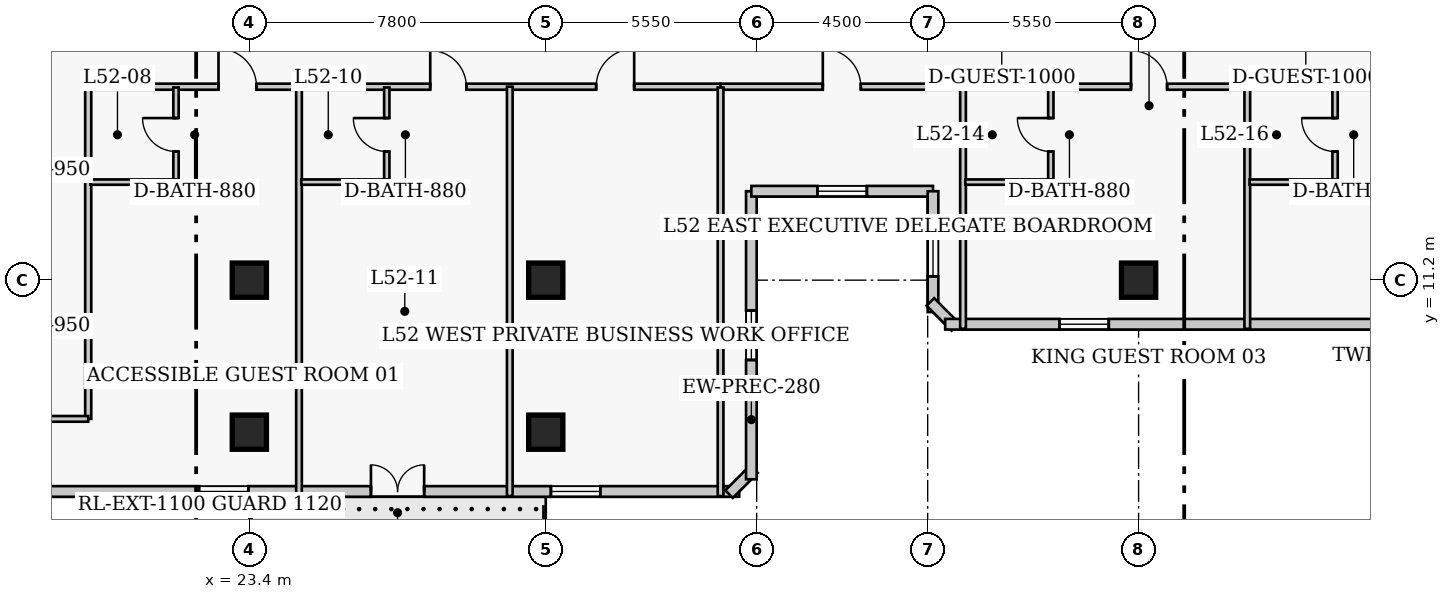
"""IFC4 building model, lengths in metres.
Left out: names, types, materials, properties, quantities, classifications, styles, units other than length and angle.
Written with IfcOpenShell. Run it as: python <this file> out.ifc"""

import sys

from ifc_helpers import new_model, si_unit, direction, frame, frame_2d, origin, origin_2d, place, context, subcontext, project, spatial, rectangle, extrude, element, fill, save


model = new_model("IFC4")
c1 = context("Model", 3, precision=1e-05, world=origin(), true_north=direction((0.0, 1.0)))
c2 = subcontext(c1, "Body", "Model", "MODEL_VIEW")
j1 = project(units=[si_unit("LENGTHUNIT", "METRE"), si_unit("PLANEANGLEUNIT", "RADIAN")], contexts=[c1])
p1 = place(None, origin())
s1 = spatial("IfcSite", under=j1, at=p1, CompositionType="ELEMENT")
p2 = place(p1, origin())
s2 = spatial("IfcBuilding", under=s1, at=p2, CompositionType="ELEMENT")
p3 = place(p2, frame((0.0, 0.0, 208.5)))
s3 = spatial("IfcBuildingStorey", under=s2, at=p3, CompositionType="ELEMENT", Elevation=208.5)
for number, where, z_axis, x_axis in (
    (1, (23.4, 11.2, 0.0), (0.0, 0.0, 1.0), (1.0, 0.0, 0.0)),
    (2, (31.2, 11.2, 0.0), (0.0, 0.0, 1.0), (1.0, 0.0, 0.0)),
    (3, (46.8, 11.2, 0.0), (0.0, 0.0, 1.0), (1.0, 0.0, 0.0)),
    (4, (23.4, 7.2, 0.0), (0.0, 0.0, 1.0), (1.0, 0.0, 0.0)),
    (5, (31.2, 7.2, 0.0), (0.0, 0.0, 1.0), (1.0, 0.0, 0.0)),
):
    element("IfcColumn", number, at=place(p3, frame(where, z_axis=z_axis, x_axis=x_axis)), inside=s3, PredefinedType="COLUMN", context=c2, shape_type="SweptSolid", body=[
        extrude(rectangle(XDim=0.9, YDim=0.9, at=origin_2d()), origin(), (0.0, 0.0, 1.0), 3.9),
    ])
p4 = place(p3, frame((10.46, 5.64, 0.0), z_axis=(0.0, 0.0, 1.0), x_axis=(1.0, 0.0, 0.0)))
e6 = element("IfcWall", 6, at=p4, inside=s3, PredefinedType="SOLIDWALL", context=c2, shape_type="SweptSolid", body=[
    extrude(rectangle(XDim=25.83, YDim=0.28, at=frame_2d((12.915, 0.0))), origin(), (0.0, 0.0, 1.0), 3.65),
])
p5 = place(p4, frame((16.14, 0.0, 0.0)))
e7 = element("IfcOpeningElement", 7, at=p5, cuts=e6, PredefinedType="OPENING", context=c2, shape_type="SweptSolid", body=[
    extrude(rectangle(XDim=1.4, YDim=2.15, at=frame_2d((0.7, 1.075))), frame((0.0, 0.15, 0.0), z_axis=(0.0, -1.0, 0.0), x_axis=(1.0, 0.0, 0.0)), (0.0, 0.0, 1.0), 0.3),
])
p6 = place(p4, frame((4.305, 0.0, 0.85)))
e8 = element("IfcOpeningElement", 8, at=p6, cuts=e6, PredefinedType="OPENING", context=c2, shape_type="SweptSolid", body=[
    extrude(rectangle(XDim=1.3, YDim=1.7, at=frame_2d((0.65, 0.85))), frame((0.0, 0.15, 0.0), z_axis=(0.0, -1.0, 0.0), x_axis=(1.0, 0.0, 0.0)), (0.0, 0.0, 1.0), 0.3),
])
p7 = place(p4, frame((11.615, 0.0, 0.85)))
e9 = element("IfcOpeningElement", 9, at=p7, cuts=e6, PredefinedType="OPENING", context=c2, shape_type="SweptSolid", body=[
    extrude(rectangle(XDim=1.3, YDim=1.7, at=frame_2d((0.65, 0.85))), frame((0.0, 0.15, 0.0), z_axis=(0.0, -1.0, 0.0), x_axis=(1.0, 0.0, 0.0)), (0.0, 0.0, 1.0), 0.3),
])
p8 = place(p4, frame((20.875, 0.0, 0.85)))
e10 = element("IfcOpeningElement", 10, at=p8, cuts=e6, PredefinedType="OPENING", context=c2, shape_type="SweptSolid", body=[
    extrude(rectangle(XDim=1.3, YDim=1.7, at=frame_2d((0.65, 0.85))), frame((0.0, 0.15, 0.0), z_axis=(0.0, -1.0, 0.0), x_axis=(1.0, 0.0, 0.0)), (0.0, 0.0, 1.0), 0.3),
])
p9 = place(p3, frame((36.023, 5.571, 0.0), z_axis=(0.0, 0.0, 1.0), x_axis=(0.707106781187, 0.707106781187, 0.0)))
e11 = element("IfcWall", 11, at=p9, inside=s3, PredefinedType="SOLIDWALL", context=c2, shape_type="SweptSolid", body=[
    extrude(rectangle(XDim=0.928, YDim=0.28, at=frame_2d((0.464, 0.0))), origin(), (0.0, 0.0, 1.0), 3.65),
])
p10 = place(p3, frame((36.61, 5.96, 0.0), z_axis=(0.0, 0.0, 1.0), x_axis=(0.0, 1.0, 0.0)))
e12 = element("IfcWall", 12, at=p10, inside=s3, PredefinedType="SOLIDWALL", context=c2, shape_type="SweptSolid", body=[
    extrude(rectangle(XDim=7.58, YDim=0.28, at=frame_2d((3.79, 0.0))), origin(), (0.0, 0.0, 1.0), 3.65),
])
p11 = place(p10, frame((3.14, 0.0, 0.85)))
e13 = element("IfcOpeningElement", 13, at=p11, cuts=e12, PredefinedType="OPENING", context=c2, shape_type="SweptSolid", body=[
    extrude(rectangle(XDim=1.3, YDim=1.7, at=frame_2d((0.65, 0.85))), frame((0.0, 0.15, 0.0), z_axis=(0.0, -1.0, 0.0), x_axis=(1.0, 0.0, 0.0)), (0.0, 0.0, 1.0), 0.3),
])
p12 = place(p3, frame((36.61, 13.54, 0.0), z_axis=(0.0, 0.0, 1.0), x_axis=(1.0, 0.0, 0.0)))
e14 = element("IfcWall", 14, at=p12, inside=s3, PredefinedType="SOLIDWALL", context=c2, shape_type="SweptSolid", body=[
    extrude(rectangle(XDim=4.78, YDim=0.28, at=frame_2d((2.39, 0.0))), origin(), (0.0, 0.0, 1.0), 3.65),
])
p13 = place(p12, frame((1.74, 0.0, 0.85)))
e15 = element("IfcOpeningElement", 15, at=p13, cuts=e14, PredefinedType="OPENING", context=c2, shape_type="SweptSolid", body=[
    extrude(rectangle(XDim=1.3, YDim=1.7, at=frame_2d((0.65, 0.85))), frame((0.0, 0.15, 0.0), z_axis=(0.0, -1.0, 0.0), x_axis=(1.0, 0.0, 0.0)), (0.0, 0.0, 1.0), 0.3),
])
p14 = place(p3, frame((41.39, 13.54, 0.0), z_axis=(0.0, 0.0, 1.0), x_axis=(0.0, -1.0, 0.0)))
e16 = element("IfcWall", 16, at=p14, inside=s3, PredefinedType="SOLIDWALL", context=c2, shape_type="SweptSolid", body=[
    extrude(rectangle(XDim=3.18, YDim=0.28, at=frame_2d((1.59, 0.0))), origin(), (0.0, 0.0, 1.0), 3.65),
])
p15 = place(p14, frame((0.94, 0.0, 0.85)))
e17 = element("IfcOpeningElement", 17, at=p15, cuts=e16, PredefinedType="OPENING", context=c2, shape_type="SweptSolid", body=[
    extrude(rectangle(XDim=1.3, YDim=1.7, at=frame_2d((0.65, 0.85))), frame((0.0, 0.15, 0.0), z_axis=(0.0, -1.0, 0.0), x_axis=(1.0, 0.0, 0.0)), (0.0, 0.0, 1.0), 0.3),
])
p16 = place(p3, frame((41.321, 10.627, 0.0), z_axis=(0.0, 0.0, 1.0), x_axis=(0.707106781187, -0.707106781187, 0.0)))
e18 = element("IfcWall", 18, at=p16, inside=s3, PredefinedType="SOLIDWALL", context=c2, shape_type="SweptSolid", body=[
    extrude(rectangle(XDim=0.928, YDim=0.28, at=frame_2d((0.464, 0.0))), origin(), (0.0, 0.0, 1.0), 3.65),
])
p17 = place(p3, frame((41.71, 10.04, 0.0), z_axis=(0.0, 0.0, 1.0), x_axis=(1.0, 0.0, 0.0)))
e19 = element("IfcWall", 19, at=p17, inside=s3, PredefinedType="SOLIDWALL", context=c2, shape_type="SweptSolid", body=[
    extrude(rectangle(XDim=25.83, YDim=0.28, at=frame_2d((12.915, 0.0))), origin(), (0.0, 0.0, 1.0), 3.65),
])
p18 = place(p17, frame((3.005, 0.0, 0.85)))
e20 = element("IfcOpeningElement", 20, at=p18, cuts=e19, PredefinedType="OPENING", context=c2, shape_type="SweptSolid", body=[
    extrude(rectangle(XDim=1.3, YDim=1.7, at=frame_2d((0.65, 0.85))), frame((0.0, 0.15, 0.0), z_axis=(0.0, -1.0, 0.0), x_axis=(1.0, 0.0, 0.0)), (0.0, 0.0, 1.0), 0.3),
])
p19 = place(p17, frame((13.415, 0.0, 0.85)))
e21 = element("IfcOpeningElement", 21, at=p19, cuts=e19, PredefinedType="OPENING", context=c2, shape_type="SweptSolid", body=[
    extrude(rectangle(XDim=1.3, YDim=1.7, at=frame_2d((0.65, 0.85))), frame((0.0, 0.15, 0.0), z_axis=(0.0, -1.0, 0.0), x_axis=(1.0, 0.0, 0.0)), (0.0, 0.0, 1.0), 0.3),
])
p20 = place(p17, frame((21.525, 0.0, 0.85)))
e22 = element("IfcOpeningElement", 22, at=p20, cuts=e19, PredefinedType="OPENING", context=c2, shape_type="SweptSolid", body=[
    extrude(rectangle(XDim=1.3, YDim=1.7, at=frame_2d((0.65, 0.85))), frame((0.0, 0.15, 0.0), z_axis=(0.0, -1.0, 0.0), x_axis=(1.0, 0.0, 0.0)), (0.0, 0.0, 1.0), 0.3),
])
p21 = place(p3, frame((19.1, 16.29, 0.0), z_axis=(0.0, 0.0, 1.0), x_axis=(1.0, 0.0, 0.0)))
e23 = element("IfcWall", 23, at=p21, inside=s3, PredefinedType="PARTITIONING", context=c2, shape_type="SweptSolid", body=[
    extrude(rectangle(XDim=16.7, YDim=0.16, at=frame_2d((8.35, 0.0))), origin(), (0.0, 0.0, 1.0), 3.65),
])
p22 = place(p21, frame((3.488, 0.0, 0.0)))
e24 = element("IfcOpeningElement", 24, at=p22, cuts=e23, PredefinedType="OPENING", context=c2, shape_type="SweptSolid", body=[
    extrude(rectangle(XDim=1.0, YDim=2.15, at=frame_2d((0.5, 1.075))), frame((0.0, 0.09, 0.0), z_axis=(0.0, -1.0, 0.0), x_axis=(1.0, 0.0, 0.0)), (0.0, 0.0, 1.0), 0.18),
])
p23 = place(p21, frame((9.06, 0.0, 0.0)))
e25 = element("IfcOpeningElement", 25, at=p23, cuts=e23, PredefinedType="OPENING", context=c2, shape_type="SweptSolid", body=[
    extrude(rectangle(XDim=0.95, YDim=2.1, at=frame_2d((0.475, 1.05))), frame((0.0, 0.09, 0.0), z_axis=(0.0, -1.0, 0.0), x_axis=(1.0, 0.0, 0.0)), (0.0, 0.0, 1.0), 0.18),
])
p24 = place(p21, frame((13.427, 0.0, 0.0)))
e26 = element("IfcOpeningElement", 26, at=p24, cuts=e23, PredefinedType="OPENING", context=c2, shape_type="SweptSolid", body=[
    extrude(rectangle(XDim=1.0, YDim=2.15, at=frame_2d((0.5, 1.075))), frame((0.0, 0.09, 0.0), z_axis=(0.0, -1.0, 0.0), x_axis=(1.0, 0.0, 0.0)), (0.0, 0.0, 1.0), 0.18),
])
p25 = place(p3, frame((35.8, 16.29, 0.0), z_axis=(0.0, 0.0, 1.0), x_axis=(1.0, 0.0, 0.0)))
e27 = element("IfcWall", 27, at=p25, inside=s3, PredefinedType="PARTITIONING", context=c2, shape_type="SweptSolid", body=[
    extrude(rectangle(XDim=22.5, YDim=0.16, at=frame_2d((11.25, 0.0))), origin(), (0.0, 0.0, 1.0), 3.65),
])
p26 = place(p25, frame((2.69, 0.0, 0.0)))
e28 = element("IfcOpeningElement", 28, at=p26, cuts=e27, PredefinedType="OPENING", context=c2, shape_type="SweptSolid", body=[
    extrude(rectangle(XDim=1.0, YDim=2.15, at=frame_2d((0.5, 1.075))), frame((0.0, 0.09, 0.0), z_axis=(0.0, -1.0, 0.0), x_axis=(1.0, 0.0, 0.0)), (0.0, 0.0, 1.0), 0.18),
])
p27 = place(p25, frame((10.8, 0.0, 0.0)))
e29 = element("IfcOpeningElement", 29, at=p27, cuts=e27, PredefinedType="OPENING", context=c2, shape_type="SweptSolid", body=[
    extrude(rectangle(XDim=0.95, YDim=2.1, at=frame_2d((0.475, 1.05))), frame((0.0, 0.09, 0.0), z_axis=(0.0, -1.0, 0.0), x_axis=(1.0, 0.0, 0.0)), (0.0, 0.0, 1.0), 0.18),
])
p28 = place(p25, frame((18.83, 0.0, 0.0)))
e30 = element("IfcOpeningElement", 30, at=p28, cuts=e27, PredefinedType="OPENING", context=c2, shape_type="SweptSolid", body=[
    extrude(rectangle(XDim=0.95, YDim=2.1, at=frame_2d((0.475, 1.05))), frame((0.0, 0.09, 0.0), z_axis=(0.0, -1.0, 0.0), x_axis=(1.0, 0.0, 0.0)), (0.0, 0.0, 1.0), 0.18),
])
p29 = place(p3, frame((19.16, 7.55, 0.0), z_axis=(0.0, 0.0, 1.0), x_axis=(0.0, 1.0, 0.0)))
e31 = element("IfcWall", 31, at=p29, inside=s3, PredefinedType="PARTITIONING", context=c2, shape_type="SweptSolid", body=[
    extrude(rectangle(XDim=8.74, YDim=0.16, at=frame_2d((4.37, 0.0))), origin(), (0.0, 0.0, 1.0), 3.65),
])
p30 = place(p3, frame((16.94, 7.55, 0.0), z_axis=(0.0, 0.0, 1.0), x_axis=(1.0, 0.0, 0.0)))
e32 = element("IfcWall", 32, at=p30, inside=s3, PredefinedType="PARTITIONING", context=c2, shape_type="SweptSolid", body=[
    extrude(rectangle(XDim=2.22, YDim=0.15, at=frame_2d((1.11, 0.0))), origin(), (0.0, 0.0, 1.0), 3.65),
])
p31 = place(p3, frame((21.47, 13.78, 0.0), z_axis=(0.0, 0.0, 1.0), x_axis=(0.0, 1.0, 0.0)))
e33 = element("IfcWall", 33, at=p31, inside=s3, PredefinedType="PLUMBINGWALL", context=c2, shape_type="SweptSolid", body=[
    extrude(rectangle(XDim=2.49, YDim=0.14, at=frame_2d((1.245, 0.0))), origin(), (0.0, 0.0, 1.0), 3.65),
])
p32 = place(p31, frame((0.805, 0.0, 0.0)))
e34 = element("IfcOpeningElement", 34, at=p32, cuts=e33, PredefinedType="OPENING", context=c2, shape_type="SweptSolid", body=[
    extrude(rectangle(XDim=0.88, YDim=2.05, at=frame_2d((0.44, 1.025))), frame((0.0, 0.08, 0.0), z_axis=(0.0, -1.0, 0.0), x_axis=(1.0, 0.0, 0.0)), (0.0, 0.0, 1.0), 0.16),
])
p33 = place(p3, frame((19.22, 13.78, 0.0), z_axis=(0.0, 0.0, 1.0), x_axis=(1.0, 0.0, 0.0)))
e35 = element("IfcWall", 35, at=p33, inside=s3, PredefinedType="PLUMBINGWALL", context=c2, shape_type="SweptSolid", body=[
    extrude(rectangle(XDim=2.25, YDim=0.14, at=frame_2d((1.125, 0.0))), origin(), (0.0, 0.0, 1.0), 3.65),
])
p34 = place(p3, frame((24.707, 5.52, 0.0), z_axis=(0.0, 0.0, 1.0), x_axis=(0.0, 1.0, 0.0)))
e36 = element("IfcWall", 36, at=p34, inside=s3, PredefinedType="PARTITIONING", context=c2, shape_type="SweptSolid", body=[
    extrude(rectangle(XDim=10.77, YDim=0.15, at=frame_2d((5.385, 0.0))), origin(), (0.0, 0.0, 1.0), 3.65),
])
p35 = place(p3, frame((27.017, 13.78, 0.0), z_axis=(0.0, 0.0, 1.0), x_axis=(0.0, 1.0, 0.0)))
e37 = element("IfcWall", 37, at=p35, inside=s3, PredefinedType="PLUMBINGWALL", context=c2, shape_type="SweptSolid", body=[
    extrude(rectangle(XDim=2.49, YDim=0.14, at=frame_2d((1.245, 0.0))), origin(), (0.0, 0.0, 1.0), 3.65),
])
p36 = place(p35, frame((0.805, 0.0, 0.0)))
e38 = element("IfcOpeningElement", 38, at=p36, cuts=e37, PredefinedType="OPENING", context=c2, shape_type="SweptSolid", body=[
    extrude(rectangle(XDim=0.88, YDim=2.05, at=frame_2d((0.44, 1.025))), frame((0.0, 0.08, 0.0), z_axis=(0.0, -1.0, 0.0), x_axis=(1.0, 0.0, 0.0)), (0.0, 0.0, 1.0), 0.16),
])
p37 = place(p3, frame((24.767, 13.78, 0.0), z_axis=(0.0, 0.0, 1.0), x_axis=(1.0, 0.0, 0.0)))
e39 = element("IfcWall", 39, at=p37, inside=s3, PredefinedType="PLUMBINGWALL", context=c2, shape_type="SweptSolid", body=[
    extrude(rectangle(XDim=2.25, YDim=0.14, at=frame_2d((1.125, 0.0))), origin(), (0.0, 0.0, 1.0), 3.65),
])
p38 = place(p3, frame((30.253, 5.52, 0.0), z_axis=(0.0, 0.0, 1.0), x_axis=(0.0, 1.0, 0.0)))
e40 = element("IfcWall", 40, at=p38, inside=s3, PredefinedType="PARTITIONING", context=c2, shape_type="SweptSolid", body=[
    extrude(rectangle(XDim=10.77, YDim=0.15, at=frame_2d((5.385, 0.0))), origin(), (0.0, 0.0, 1.0), 3.65),
])
p39 = place(p3, frame((35.8, 5.52, 0.0), z_axis=(0.0, 0.0, 1.0), x_axis=(0.0, 1.0, 0.0)))
e41 = element("IfcWall", 41, at=p39, inside=s3, PredefinedType="PARTITIONING", context=c2, shape_type="SweptSolid", body=[
    extrude(rectangle(XDim=10.75, YDim=0.15, at=frame_2d((5.375, 0.0))), origin(), (0.0, 0.0, 1.0), 3.65),
])
p40 = place(p3, frame((42.18, 9.92, 0.0), z_axis=(0.0, 0.0, 1.0), x_axis=(0.0, 1.0, 0.0)))
e42 = element("IfcWall", 42, at=p40, inside=s3, PredefinedType="PARTITIONING", context=c2, shape_type="SweptSolid", body=[
    extrude(rectangle(XDim=6.37, YDim=0.15, at=frame_2d((3.185, 0.0))), origin(), (0.0, 0.0, 1.0), 3.65),
])
p41 = place(p3, frame((44.49, 13.78, 0.0), z_axis=(0.0, 0.0, 1.0), x_axis=(0.0, 1.0, 0.0)))
e43 = element("IfcWall", 43, at=p41, inside=s3, PredefinedType="PLUMBINGWALL", context=c2, shape_type="SweptSolid", body=[
    extrude(rectangle(XDim=2.49, YDim=0.14, at=frame_2d((1.245, 0.0))), origin(), (0.0, 0.0, 1.0), 3.65),
])
p42 = place(p41, frame((0.805, 0.0, 0.0)))
e44 = element("IfcOpeningElement", 44, at=p42, cuts=e43, PredefinedType="OPENING", context=c2, shape_type="SweptSolid", body=[
    extrude(rectangle(XDim=0.88, YDim=2.05, at=frame_2d((0.44, 1.025))), frame((0.0, 0.08, 0.0), z_axis=(0.0, -1.0, 0.0), x_axis=(1.0, 0.0, 0.0)), (0.0, 0.0, 1.0), 0.16),
])
p43 = place(p3, frame((42.24, 13.78, 0.0), z_axis=(0.0, 0.0, 1.0), x_axis=(1.0, 0.0, 0.0)))
e45 = element("IfcWall", 45, at=p43, inside=s3, PredefinedType="PLUMBINGWALL", context=c2, shape_type="SweptSolid", body=[
    extrude(rectangle(XDim=2.25, YDim=0.14, at=frame_2d((1.125, 0.0))), origin(), (0.0, 0.0, 1.0), 3.65),
])
p44 = place(p3, frame((49.66, 9.92, 0.0), z_axis=(0.0, 0.0, 1.0), x_axis=(0.0, 1.0, 0.0)))
e46 = element("IfcWall", 46, at=p44, inside=s3, PredefinedType="PARTITIONING", context=c2, shape_type="SweptSolid", body=[
    extrude(rectangle(XDim=6.37, YDim=0.15, at=frame_2d((3.185, 0.0))), origin(), (0.0, 0.0, 1.0), 3.65),
])
p45 = place(p3, frame((51.97, 13.78, 0.0), z_axis=(0.0, 0.0, 1.0), x_axis=(0.0, 1.0, 0.0)))
e47 = element("IfcWall", 47, at=p45, inside=s3, PredefinedType="PLUMBINGWALL", context=c2, shape_type="SweptSolid", body=[
    extrude(rectangle(XDim=2.49, YDim=0.14, at=frame_2d((1.245, 0.0))), origin(), (0.0, 0.0, 1.0), 3.65),
])
p46 = place(p45, frame((0.805, 0.0, 0.0)))
e48 = element("IfcOpeningElement", 48, at=p46, cuts=e47, PredefinedType="OPENING", context=c2, shape_type="SweptSolid", body=[
    extrude(rectangle(XDim=0.88, YDim=2.05, at=frame_2d((0.44, 1.025))), frame((0.0, 0.08, 0.0), z_axis=(0.0, -1.0, 0.0), x_axis=(1.0, 0.0, 0.0)), (0.0, 0.0, 1.0), 0.16),
])
p47 = place(p3, frame((49.72, 13.78, 0.0), z_axis=(0.0, 0.0, 1.0), x_axis=(1.0, 0.0, 0.0)))
e49 = element("IfcWall", 49, at=p47, inside=s3, PredefinedType="PLUMBINGWALL", context=c2, shape_type="SweptSolid", body=[
    extrude(rectangle(XDim=2.25, YDim=0.14, at=frame_2d((1.125, 0.0))), origin(), (0.0, 0.0, 1.0), 3.65),
])
p48 = place(p5, origin())
e50 = element("IfcDoor", 50, at=p48, inside=s3, OperationType="DOUBLE_DOOR_SINGLE_SWING", PredefinedType="DOOR", context=c2, shape_type="SweptSolid", body=[
    extrude(rectangle(XDim=1.4, YDim=2.15, at=frame_2d((0.7, 1.075))), frame((0.0, 0.025, 0.0), z_axis=(0.0, -1.0, 0.0), x_axis=(1.0, 0.0, 0.0)), (0.0, 0.0, 1.0), 0.05),
])
fill(e7, e50)
p49 = place(p7, origin())
e51 = element("IfcWindow", 51, at=p49, inside=s3, PartitioningType="SINGLE_PANEL", PredefinedType="WINDOW", context=c2, shape_type="SweptSolid", body=[
    extrude(rectangle(XDim=1.3, YDim=1.7, at=frame_2d((0.65, 0.85))), frame((0.0, 0.03, 0.0), z_axis=(0.0, -1.0, 0.0), x_axis=(1.0, 0.0, 0.0)), (0.0, 0.0, 1.0), 0.06),
])
fill(e9, e51)
p50 = place(p8, origin())
e52 = element("IfcWindow", 52, at=p50, inside=s3, PartitioningType="SINGLE_PANEL", PredefinedType="WINDOW", context=c2, shape_type="SweptSolid", body=[
    extrude(rectangle(XDim=1.3, YDim=1.7, at=frame_2d((0.65, 0.85))), frame((0.0, 0.03, 0.0), z_axis=(0.0, -1.0, 0.0), x_axis=(1.0, 0.0, 0.0)), (0.0, 0.0, 1.0), 0.06),
])
fill(e10, e52)
p51 = place(p11, origin())
e53 = element("IfcWindow", 53, at=p51, inside=s3, PartitioningType="SINGLE_PANEL", PredefinedType="WINDOW", context=c2, shape_type="SweptSolid", body=[
    extrude(rectangle(XDim=1.3, YDim=1.7, at=frame_2d((0.65, 0.85))), frame((0.0, 0.03, 0.0), z_axis=(0.0, -1.0, 0.0), x_axis=(1.0, 0.0, 0.0)), (0.0, 0.0, 1.0), 0.06),
])
fill(e13, e53)
p52 = place(p13, origin())
e54 = element("IfcWindow", 54, at=p52, inside=s3, PartitioningType="SINGLE_PANEL", PredefinedType="WINDOW", context=c2, shape_type="SweptSolid", body=[
    extrude(rectangle(XDim=1.3, YDim=1.7, at=frame_2d((0.65, 0.85))), frame((0.0, 0.03, 0.0), z_axis=(0.0, -1.0, 0.0), x_axis=(1.0, 0.0, 0.0)), (0.0, 0.0, 1.0), 0.06),
])
fill(e15, e54)
p53 = place(p15, origin())
e55 = element("IfcWindow", 55, at=p53, inside=s3, PartitioningType="SINGLE_PANEL", PredefinedType="WINDOW", context=c2, shape_type="SweptSolid", body=[
    extrude(rectangle(XDim=1.3, YDim=1.7, at=frame_2d((0.65, 0.85))), frame((0.0, 0.03, 0.0), z_axis=(0.0, -1.0, 0.0), x_axis=(1.0, 0.0, 0.0)), (0.0, 0.0, 1.0), 0.06),
])
fill(e17, e55)
p54 = place(p18, origin())
e56 = element("IfcWindow", 56, at=p54, inside=s3, PartitioningType="SINGLE_PANEL", PredefinedType="WINDOW", context=c2, shape_type="SweptSolid", body=[
    extrude(rectangle(XDim=1.3, YDim=1.7, at=frame_2d((0.65, 0.85))), frame((0.0, 0.03, 0.0), z_axis=(0.0, -1.0, 0.0), x_axis=(1.0, 0.0, 0.0)), (0.0, 0.0, 1.0), 0.06),
])
fill(e20, e56)
p55 = place(p32, origin())
e57 = element("IfcDoor", 57, at=p55, inside=s3, OperationType="SINGLE_SWING_RIGHT", PredefinedType="DOOR", context=c2, shape_type="SweptSolid", body=[
    extrude(rectangle(XDim=0.88, YDim=2.05, at=frame_2d((0.44, 1.025))), frame((0.0, 0.025, 0.0), z_axis=(0.0, -1.0, 0.0), x_axis=(1.0, 0.0, 0.0)), (0.0, 0.0, 1.0), 0.05),
])
fill(e34, e57)
p56 = place(p22, origin())
e58 = element("IfcDoor", 58, at=p56, inside=s3, OperationType="SINGLE_SWING_LEFT", PredefinedType="DOOR", context=c2, shape_type="SweptSolid", body=[
    extrude(rectangle(XDim=1.0, YDim=2.15, at=frame_2d((0.5, 1.075))), frame((0.0, 0.025, 0.0), z_axis=(0.0, -1.0, 0.0), x_axis=(1.0, 0.0, 0.0)), (0.0, 0.0, 1.0), 0.05),
])
fill(e24, e58)
p57 = place(p36, origin())
e59 = element("IfcDoor", 59, at=p57, inside=s3, OperationType="SINGLE_SWING_RIGHT", PredefinedType="DOOR", context=c2, shape_type="SweptSolid", body=[
    extrude(rectangle(XDim=0.88, YDim=2.05, at=frame_2d((0.44, 1.025))), frame((0.0, 0.025, 0.0), z_axis=(0.0, -1.0, 0.0), x_axis=(1.0, 0.0, 0.0)), (0.0, 0.0, 1.0), 0.05),
])
fill(e38, e59)
p58 = place(p23, origin())
e60 = element("IfcDoor", 60, at=p58, inside=s3, OperationType="SINGLE_SWING_LEFT", PredefinedType="DOOR", context=c2, shape_type="SweptSolid", body=[
    extrude(rectangle(XDim=0.95, YDim=2.1, at=frame_2d((0.475, 1.05))), frame((0.0, 0.025, 0.0), z_axis=(0.0, -1.0, 0.0), x_axis=(1.0, 0.0, 0.0)), (0.0, 0.0, 1.0), 0.05),
])
fill(e25, e60)
p59 = place(p24, origin())
e61 = element("IfcDoor", 61, at=p59, inside=s3, OperationType="SINGLE_SWING_RIGHT", PredefinedType="DOOR", context=c2, shape_type="SweptSolid", body=[
    extrude(rectangle(XDim=1.0, YDim=2.15, at=frame_2d((0.5, 1.075))), frame((0.0, 0.025, 0.0), z_axis=(0.0, -1.0, 0.0), x_axis=(1.0, 0.0, 0.0)), (0.0, 0.0, 1.0), 0.05),
])
fill(e26, e61)
p60 = place(p26, origin())
e62 = element("IfcDoor", 62, at=p60, inside=s3, OperationType="SINGLE_SWING_LEFT", PredefinedType="DOOR", context=c2, shape_type="SweptSolid", body=[
    extrude(rectangle(XDim=1.0, YDim=2.15, at=frame_2d((0.5, 1.075))), frame((0.0, 0.025, 0.0), z_axis=(0.0, -1.0, 0.0), x_axis=(1.0, 0.0, 0.0)), (0.0, 0.0, 1.0), 0.05),
])
fill(e28, e62)
p61 = place(p42, origin())
e63 = element("IfcDoor", 63, at=p61, inside=s3, OperationType="SINGLE_SWING_RIGHT", PredefinedType="DOOR", context=c2, shape_type="SweptSolid", body=[
    extrude(rectangle(XDim=0.88, YDim=2.05, at=frame_2d((0.44, 1.025))), frame((0.0, 0.025, 0.0), z_axis=(0.0, -1.0, 0.0), x_axis=(1.0, 0.0, 0.0)), (0.0, 0.0, 1.0), 0.05),
])
fill(e44, e63)
p62 = place(p27, origin())
e64 = element("IfcDoor", 64, at=p62, inside=s3, OperationType="SINGLE_SWING_LEFT", PredefinedType="DOOR", context=c2, shape_type="SweptSolid", body=[
    extrude(rectangle(XDim=0.95, YDim=2.1, at=frame_2d((0.475, 1.05))), frame((0.0, 0.025, 0.0), z_axis=(0.0, -1.0, 0.0), x_axis=(1.0, 0.0, 0.0)), (0.0, 0.0, 1.0), 0.05),
])
fill(e29, e64)
p63 = place(p46, origin())
e65 = element("IfcDoor", 65, at=p63, inside=s3, OperationType="SINGLE_SWING_RIGHT", PredefinedType="DOOR", context=c2, shape_type="SweptSolid", body=[
    extrude(rectangle(XDim=0.88, YDim=2.05, at=frame_2d((0.44, 1.025))), frame((0.0, 0.025, 0.0), z_axis=(0.0, -1.0, 0.0), x_axis=(1.0, 0.0, 0.0)), (0.0, 0.0, 1.0), 0.05),
])
fill(e48, e65)
save(model, sys.argv[1])
